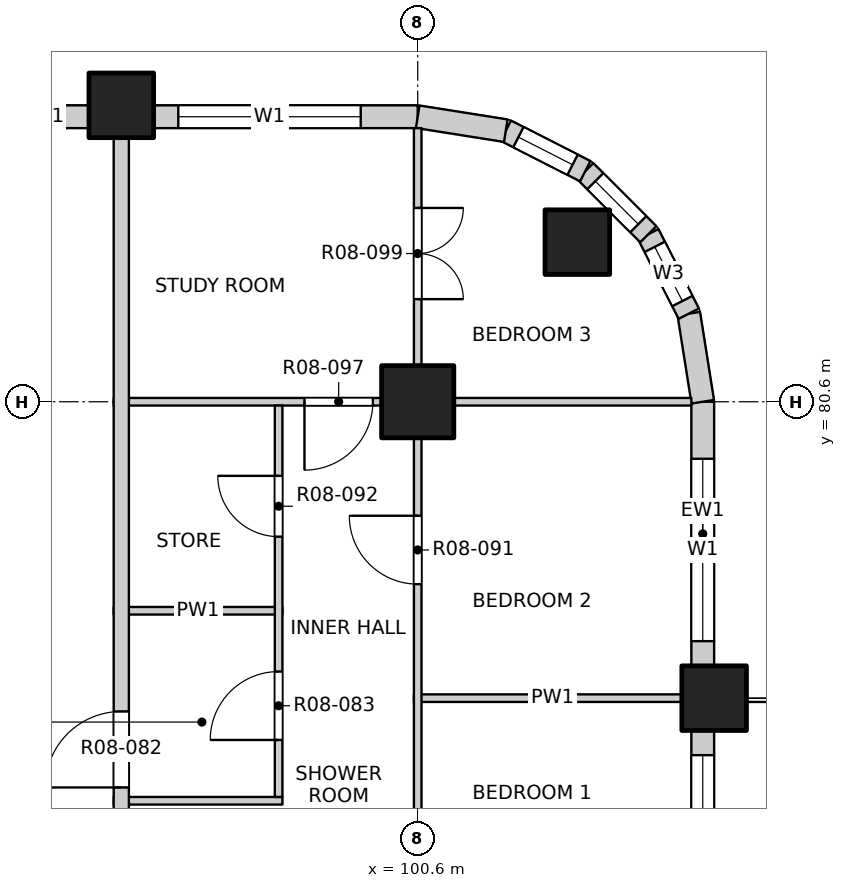
"""IFC4 building model, lengths in metres.
Left out: names, types, materials, properties, quantities, classifications, styles, units other than length and angle.
Written with IfcOpenShell. Run it as: python <this file> out.ifc"""

import sys

from ifc_helpers import new_model, si_unit, direction, frame, frame_2d, origin, origin_2d, place, context, subcontext, project, spatial, rectangle, extrude, element, fill, save


model = new_model("IFC4")
c1 = context("Model", 3, precision=1e-05, world=origin(), true_north=direction((0.0, 1.0)))
c2 = subcontext(c1, "Body", "Model", "MODEL_VIEW")
j1 = project(units=[si_unit("LENGTHUNIT", "METRE"), si_unit("PLANEANGLEUNIT", "RADIAN")], contexts=[c1])
p1 = place(None, origin())
s1 = spatial("IfcSite", under=j1, at=p1, CompositionType="ELEMENT")
p2 = place(p1, origin())
s2 = spatial("IfcBuilding", under=s1, at=p2, CompositionType="ELEMENT")
p3 = place(p2, frame((0.0, 0.0, 99.9)))
s3 = spatial("IfcBuildingStorey", under=s2, at=p3, CompositionType="ELEMENT", Elevation=99.9)
for number, where, z_axis, x_axis in (
    (1, (102.7, 82.7, -0.3), (0.0, 0.0, 1.0), (1.0, 0.0, 0.0)),
    (2, (104.5, 76.7, -0.3), (0.0, 0.0, 1.0), (1.0, 0.0, 0.0)),
    (3, (96.7, 84.5, -0.3), (0.0, 0.0, 1.0), (1.0, 0.0, 0.0)),
):
    element("IfcColumn", number, at=place(p3, frame(where, z_axis=z_axis, x_axis=x_axis)), inside=s3, PredefinedType="COLUMN", context=c2, shape_type="SweptSolid", body=[
        extrude(rectangle(XDim=0.85, YDim=0.85, at=origin_2d()), origin(), (0.0, 0.0, 1.0), 3.45),
    ])
p4 = place(p3, frame((100.6, 80.6, -0.3), z_axis=(0.0, 0.0, 1.0), x_axis=(1.0, 0.0, 0.0)))
e4 = element("IfcColumn", 4, at=p4, inside=s3, PredefinedType="COLUMN", context=c2, shape_type="SweptSolid", body=[
    extrude(rectangle(XDim=0.95, YDim=0.95, at=origin_2d()), origin(), (0.0, 0.0, 1.0), 3.45),
])
p5 = place(p3, frame((104.35, 69.325, 0.0), z_axis=(0.0, 0.0, 1.0), x_axis=(0.0, 1.0, 0.0)))
e5 = element("IfcWall", 5, at=p5, inside=s3, PredefinedType="SOLIDWALL", context=c2, shape_type="SweptSolid", body=[
    extrude(rectangle(XDim=6.95, YDim=0.3, at=frame_2d((3.475, 0.0))), origin(), (0.0, 0.0, 1.0), 2.7),
])
p6 = place(p5, frame((0.625, 0.0, 0.0)))
e6 = element("IfcOpeningElement", 6, at=p6, cuts=e5, PredefinedType="OPENING", context=c2, shape_type="SweptSolid", body=[
    extrude(rectangle(XDim=1.8, YDim=2.4, at=frame_2d((0.9, 1.2))), frame((0.0, 0.16, 0.0), z_axis=(0.0, -1.0, 0.0), x_axis=(1.0, 0.0, 0.0)), (0.0, 0.0, 1.0), 0.32),
])
p7 = place(p5, frame((4.225, 0.0, 0.9)))
e7 = element("IfcOpeningElement", 7, at=p7, cuts=e5, PredefinedType="OPENING", context=c2, shape_type="SweptSolid", body=[
    extrude(rectangle(XDim=2.4, YDim=1.8, at=frame_2d((1.2, 0.9))), frame((0.0, 0.16, 0.0), z_axis=(0.0, -1.0, 0.0), x_axis=(1.0, 0.0, 0.0)), (0.0, 0.0, 1.0), 0.32),
])
p8 = place(p3, frame((104.35, 77.125, 0.0), z_axis=(0.0, 0.0, 1.0), x_axis=(0.0, 1.0, 0.0)))
e8 = element("IfcWall", 8, at=p8, inside=s3, PredefinedType="SOLIDWALL", context=c2, shape_type="SweptSolid", body=[
    extrude(rectangle(XDim=3.475, YDim=0.3, at=frame_2d((1.738, 0.0))), origin(), (0.0, 0.0, 1.0), 2.7),
])
p9 = place(p8, frame((0.325, 0.0, 0.9)))
e9 = element("IfcOpeningElement", 9, at=p9, cuts=e8, PredefinedType="OPENING", context=c2, shape_type="SweptSolid", body=[
    extrude(rectangle(XDim=2.4, YDim=1.8, at=frame_2d((1.2, 0.9))), frame((0.0, 0.16, 0.0), z_axis=(0.0, -1.0, 0.0), x_axis=(1.0, 0.0, 0.0)), (0.0, 0.0, 1.0), 0.32),
])
p10 = place(p3, frame((95.025, 84.35, 0.0), z_axis=(0.0, 0.0, 1.0), x_axis=(1.0, 0.0, 0.0)))
e10 = element("IfcWall", 10, at=p10, inside=s3, PredefinedType="SOLIDWALL", context=c2, shape_type="SweptSolid", body=[
    extrude(rectangle(XDim=1.25, YDim=0.3, at=frame_2d((0.625, 0.0))), origin(), (0.0, 0.0, 1.0), 2.7),
])
p11 = place(p3, frame((97.125, 84.35, 0.0), z_axis=(0.0, 0.0, 1.0), x_axis=(1.0, 0.0, 0.0)))
e11 = element("IfcWall", 11, at=p11, inside=s3, PredefinedType="SOLIDWALL", context=c2, shape_type="SweptSolid", body=[
    extrude(rectangle(XDim=3.475, YDim=0.3, at=frame_2d((1.738, 0.0))), origin(), (0.0, 0.0, 1.0), 2.7),
])
p12 = place(p11, frame((0.325, 0.0, 0.9)))
e12 = element("IfcOpeningElement", 12, at=p12, cuts=e11, PredefinedType="OPENING", context=c2, shape_type="SweptSolid", body=[
    extrude(rectangle(XDim=2.4, YDim=1.8, at=frame_2d((1.2, 0.9))), frame((0.0, 0.16, 0.0), z_axis=(0.0, -1.0, 0.0), x_axis=(1.0, 0.0, 0.0)), (0.0, 0.0, 1.0), 0.32),
])
p13 = place(p3, frame((104.35, 80.6, 0.0), z_axis=(0.0, 0.0, 1.0), x_axis=(-0.156496880861, 0.987678452879, 0.0)))
e13 = element("IfcWall", 13, at=p13, inside=s3, PredefinedType="SOLIDWALL", context=c2, shape_type="SweptSolid", body=[
    extrude(rectangle(XDim=1.173, YDim=0.3, at=frame_2d((0.586, 0.0))), origin(), (0.0, 0.0, 1.0), 2.7),
])
p14 = place(p3, frame((104.167, 81.759, 0.0), z_axis=(0.0, 0.0, 1.0), x_axis=(-0.454025524128, 0.890988677504, 0.0)))
e14 = element("IfcWall", 14, at=p14, inside=s3, PredefinedType="SOLIDWALL", context=c2, shape_type="SweptSolid", body=[
    extrude(rectangle(XDim=1.173, YDim=0.3, at=frame_2d((0.587, 0.0))), origin(), (0.0, 0.0, 1.0), 2.7),
])
p15 = place(p14, frame((0.187, 0.0, 0.9)))
e15 = element("IfcOpeningElement", 15, at=p15, cuts=e14, PredefinedType="OPENING", context=c2, shape_type="SweptSolid", body=[
    extrude(rectangle(XDim=0.8, YDim=1.2, at=frame_2d((0.4, 0.6))), frame((0.0, 0.16, 0.0), z_axis=(0.0, -1.0, 0.0), x_axis=(1.0, 0.0, 0.0)), (0.0, 0.0, 1.0), 0.32),
])
p16 = place(p3, frame((103.634, 82.804, 0.0), z_axis=(0.0, 0.0, 1.0), x_axis=(-0.707106781187, 0.707106781187, 0.0)))
e16 = element("IfcWall", 16, at=p16, inside=s3, PredefinedType="SOLIDWALL", context=c2, shape_type="SweptSolid", body=[
    extrude(rectangle(XDim=1.173, YDim=0.3, at=frame_2d((0.586, 0.0))), origin(), (0.0, 0.0, 1.0), 2.7),
])
p17 = place(p16, frame((0.187, 0.0, 0.9)))
e17 = element("IfcOpeningElement", 17, at=p17, cuts=e16, PredefinedType="OPENING", context=c2, shape_type="SweptSolid", body=[
    extrude(rectangle(XDim=0.8, YDim=1.2, at=frame_2d((0.4, 0.6))), frame((0.0, 0.16, 0.0), z_axis=(0.0, -1.0, 0.0), x_axis=(1.0, 0.0, 0.0)), (0.0, 0.0, 1.0), 0.32),
])
p18 = place(p3, frame((102.804, 83.634, 0.0), z_axis=(0.0, 0.0, 1.0), x_axis=(-0.890988677504, 0.454025524128, 0.0)))
e18 = element("IfcWall", 18, at=p18, inside=s3, PredefinedType="SOLIDWALL", context=c2, shape_type="SweptSolid", body=[
    extrude(rectangle(XDim=1.173, YDim=0.3, at=frame_2d((0.587, 0.0))), origin(), (0.0, 0.0, 1.0), 2.7),
])
p19 = place(p18, frame((0.187, 0.0, 0.9)))
e19 = element("IfcOpeningElement", 19, at=p19, cuts=e18, PredefinedType="OPENING", context=c2, shape_type="SweptSolid", body=[
    extrude(rectangle(XDim=0.8, YDim=1.2, at=frame_2d((0.4, 0.6))), frame((0.0, 0.16, 0.0), z_axis=(0.0, -1.0, 0.0), x_axis=(1.0, 0.0, 0.0)), (0.0, 0.0, 1.0), 0.32),
])
p20 = place(p3, frame((101.759, 84.167, 0.0), z_axis=(0.0, 0.0, 1.0), x_axis=(-0.987678452879, 0.156496880861, 0.0)))
e20 = element("IfcWall", 20, at=p20, inside=s3, PredefinedType="SOLIDWALL", context=c2, shape_type="SweptSolid", body=[
    extrude(rectangle(XDim=1.173, YDim=0.3, at=frame_2d((0.586, 0.0))), origin(), (0.0, 0.0, 1.0), 2.7),
])
p21 = place(p3, frame((96.6, 75.35, 0.0), z_axis=(0.0, 0.0, 1.0), x_axis=(1.0, 0.0, 0.0)))
e21 = element("IfcWall", 21, at=p21, inside=s3, PredefinedType="PARTITIONING", context=c2, shape_type="SweptSolid", body=[
    extrude(rectangle(XDim=2.22, YDim=0.1, at=frame_2d((1.11, 0.0))), origin(), (0.0, 0.0, 1.0), 3.15),
])
p22 = place(p3, frame((100.55, 76.7, 0.0), z_axis=(0.0, 0.0, 1.0), x_axis=(1.0, 0.0, 0.0)))
e22 = element("IfcWall", 22, at=p22, inside=s3, PredefinedType="PARTITIONING", context=c2, shape_type="SweptSolid", body=[
    extrude(rectangle(XDim=3.65, YDim=0.1, at=frame_2d((1.825, 0.0))), origin(), (0.0, 0.0, 1.0), 2.55),
])
p23 = place(p3, frame((96.6, 77.85, 0.0), z_axis=(0.0, 0.0, 1.0), x_axis=(1.0, 0.0, 0.0)))
e23 = element("IfcWall", 23, at=p23, inside=s3, PredefinedType="PARTITIONING", context=c2, shape_type="SweptSolid", body=[
    extrude(rectangle(XDim=2.22, YDim=0.1, at=frame_2d((1.11, 0.0))), origin(), (0.0, 0.0, 1.0), 3.15),
])
p24 = place(p3, frame((96.6, 80.6, 0.0), z_axis=(0.0, 0.0, 1.0), x_axis=(1.0, 0.0, 0.0)))
e24 = element("IfcWall", 24, at=p24, inside=s3, PredefinedType="PARTITIONING", context=c2, shape_type="SweptSolid", body=[
    extrude(rectangle(XDim=7.6, YDim=0.1, at=frame_2d((3.8, 0.0))), origin(), (0.0, 0.0, 1.0), 3.15),
])
p25 = place(p24, frame((2.51, 0.0, 0.0)))
e25 = element("IfcOpeningElement", 25, at=p25, cuts=e24, PredefinedType="OPENING", context=c2, shape_type="SweptSolid", body=[
    extrude(rectangle(XDim=0.9, YDim=2.1, at=frame_2d((0.45, 1.05))), frame((0.0, 0.06, 0.0), z_axis=(0.0, -1.0, 0.0), x_axis=(1.0, 0.0, 0.0)), (0.0, 0.0, 1.0), 0.12),
])
p26 = place(p3, frame((96.7, 53.4, 0.0), z_axis=(0.0, 0.0, 1.0), x_axis=(0.0, 1.0, 0.0)))
e26 = element("IfcWall", 26, at=p26, inside=s3, PredefinedType="PARTITIONING", context=c2, shape_type="SweptSolid", body=[
    extrude(rectangle(XDim=30.8, YDim=0.2, at=frame_2d((15.4, 0.0))), origin(), (0.0, 0.0, 1.0), 3.15),
])
p27 = place(p26, frame((5.525, 0.0, 0.0)))
e27 = element("IfcOpeningElement", 27, at=p27, cuts=e26, PredefinedType="OPENING", context=c2, shape_type="SweptSolid", body=[
    extrude(rectangle(XDim=1.0, YDim=2.1, at=frame_2d((0.5, 1.05))), frame((0.0, 0.11, 0.0), z_axis=(0.0, -1.0, 0.0), x_axis=(1.0, 0.0, 0.0)), (0.0, 0.0, 1.0), 0.22),
])
p28 = place(p26, frame((13.775, 0.0, 0.0)))
e28 = element("IfcOpeningElement", 28, at=p28, cuts=e26, PredefinedType="OPENING", context=c2, shape_type="SweptSolid", body=[
    extrude(rectangle(XDim=1.0, YDim=2.1, at=frame_2d((0.5, 1.05))), frame((0.0, 0.11, 0.0), z_axis=(0.0, -1.0, 0.0), x_axis=(1.0, 0.0, 0.0)), (0.0, 0.0, 1.0), 0.22),
])
p29 = place(p26, frame((22.125, 0.0, 0.0)))
e29 = element("IfcOpeningElement", 29, at=p29, cuts=e26, PredefinedType="OPENING", context=c2, shape_type="SweptSolid", body=[
    extrude(rectangle(XDim=1.0, YDim=2.1, at=frame_2d((0.5, 1.05))), frame((0.0, 0.11, 0.0), z_axis=(0.0, -1.0, 0.0), x_axis=(1.0, 0.0, 0.0)), (0.0, 0.0, 1.0), 0.22),
])
p30 = place(p3, frame((98.77, 75.4, 0.0), z_axis=(0.0, 0.0, 1.0), x_axis=(0.0, 1.0, 0.0)))
e30 = element("IfcWall", 30, at=p30, inside=s3, PredefinedType="PARTITIONING", context=c2, shape_type="SweptSolid", body=[
    extrude(rectangle(XDim=5.15, YDim=0.1, at=frame_2d((2.575, 0.0))), origin(), (0.0, 0.0, 1.0), 3.15),
])
p31 = place(p30, frame((0.75, 0.0, 0.0)))
e31 = element("IfcOpeningElement", 31, at=p31, cuts=e30, PredefinedType="OPENING", context=c2, shape_type="SweptSolid", body=[
    extrude(rectangle(XDim=0.9, YDim=2.1, at=frame_2d((0.45, 1.05))), frame((0.0, 0.06, 0.0), z_axis=(0.0, -1.0, 0.0), x_axis=(1.0, 0.0, 0.0)), (0.0, 0.0, 1.0), 0.12),
])
p32 = place(p30, frame((3.425, 0.0, 0.0)))
e32 = element("IfcOpeningElement", 32, at=p32, cuts=e30, PredefinedType="OPENING", context=c2, shape_type="SweptSolid", body=[
    extrude(rectangle(XDim=0.8, YDim=2.1, at=frame_2d((0.4, 1.05))), frame((0.0, 0.06, 0.0), z_axis=(0.0, -1.0, 0.0), x_axis=(1.0, 0.0, 0.0)), (0.0, 0.0, 1.0), 0.12),
])
p33 = place(p3, frame((100.6, 45.8, 0.0), z_axis=(0.0, 0.0, 1.0), x_axis=(0.0, 1.0, 0.0)))
e33 = element("IfcWall", 33, at=p33, inside=s3, PredefinedType="PARTITIONING", context=c2, shape_type="SweptSolid", body=[
    extrude(rectangle(XDim=38.4, YDim=0.1, at=frame_2d((19.2, 0.0))), origin(), (0.0, 0.0, 1.0), 3.15),
])
p34 = place(p33, frame((1.05, 0.0, 0.0)))
e34 = element("IfcOpeningElement", 34, at=p34, cuts=e33, PredefinedType="OPENING", context=c2, shape_type="SweptSolid", body=[
    extrude(rectangle(XDim=1.2, YDim=2.1, at=frame_2d((0.6, 1.05))), frame((0.0, 0.06, 0.0), z_axis=(0.0, -1.0, 0.0), x_axis=(1.0, 0.0, 0.0)), (0.0, 0.0, 1.0), 0.12),
])
p35 = place(p33, frame((5.1, 0.0, 0.0)))
e35 = element("IfcOpeningElement", 35, at=p35, cuts=e33, PredefinedType="OPENING", context=c2, shape_type="SweptSolid", body=[
    extrude(rectangle(XDim=0.9, YDim=2.1, at=frame_2d((0.45, 1.05))), frame((0.0, 0.06, 0.0), z_axis=(0.0, -1.0, 0.0), x_axis=(1.0, 0.0, 0.0)), (0.0, 0.0, 1.0), 0.12),
])
p36 = place(p33, frame((9.0, 0.0, 0.0)))
e36 = element("IfcOpeningElement", 36, at=p36, cuts=e33, PredefinedType="OPENING", context=c2, shape_type="SweptSolid", body=[
    extrude(rectangle(XDim=0.9, YDim=2.1, at=frame_2d((0.45, 1.05))), frame((0.0, 0.06, 0.0), z_axis=(0.0, -1.0, 0.0), x_axis=(1.0, 0.0, 0.0)), (0.0, 0.0, 1.0), 0.12),
])
p37 = place(p33, frame((12.9, 0.0, 0.0)))
e37 = element("IfcOpeningElement", 37, at=p37, cuts=e33, PredefinedType="OPENING", context=c2, shape_type="SweptSolid", body=[
    extrude(rectangle(XDim=0.9, YDim=2.1, at=frame_2d((0.45, 1.05))), frame((0.0, 0.06, 0.0), z_axis=(0.0, -1.0, 0.0), x_axis=(1.0, 0.0, 0.0)), (0.0, 0.0, 1.0), 0.12),
])
p38 = place(p33, frame((16.8, 0.0, 0.0)))
e38 = element("IfcOpeningElement", 38, at=p38, cuts=e33, PredefinedType="OPENING", context=c2, shape_type="SweptSolid", body=[
    extrude(rectangle(XDim=0.9, YDim=2.1, at=frame_2d((0.45, 1.05))), frame((0.0, 0.06, 0.0), z_axis=(0.0, -1.0, 0.0), x_axis=(1.0, 0.0, 0.0)), (0.0, 0.0, 1.0), 0.12),
])
p39 = place(p33, frame((20.7, 0.0, 0.0)))
e39 = element("IfcOpeningElement", 39, at=p39, cuts=e33, PredefinedType="OPENING", context=c2, shape_type="SweptSolid", body=[
    extrude(rectangle(XDim=0.9, YDim=2.1, at=frame_2d((0.45, 1.05))), frame((0.0, 0.06, 0.0), z_axis=(0.0, -1.0, 0.0), x_axis=(1.0, 0.0, 0.0)), (0.0, 0.0, 1.0), 0.12),
])
p40 = place(p33, frame((24.6, 0.0, 0.0)))
e40 = element("IfcOpeningElement", 40, at=p40, cuts=e33, PredefinedType="OPENING", context=c2, shape_type="SweptSolid", body=[
    extrude(rectangle(XDim=0.9, YDim=2.1, at=frame_2d((0.45, 1.05))), frame((0.0, 0.06, 0.0), z_axis=(0.0, -1.0, 0.0), x_axis=(1.0, 0.0, 0.0)), (0.0, 0.0, 1.0), 0.12),
])
p41 = place(p33, frame((28.5, 0.0, 0.0)))
e41 = element("IfcOpeningElement", 41, at=p41, cuts=e33, PredefinedType="OPENING", context=c2, shape_type="SweptSolid", body=[
    extrude(rectangle(XDim=0.9, YDim=2.1, at=frame_2d((0.45, 1.05))), frame((0.0, 0.06, 0.0), z_axis=(0.0, -1.0, 0.0), x_axis=(1.0, 0.0, 0.0)), (0.0, 0.0, 1.0), 0.12),
])
p42 = place(p33, frame((32.4, 0.0, 0.0)))
e42 = element("IfcOpeningElement", 42, at=p42, cuts=e33, PredefinedType="OPENING", context=c2, shape_type="SweptSolid", body=[
    extrude(rectangle(XDim=0.9, YDim=2.1, at=frame_2d((0.45, 1.05))), frame((0.0, 0.06, 0.0), z_axis=(0.0, -1.0, 0.0), x_axis=(1.0, 0.0, 0.0)), (0.0, 0.0, 1.0), 0.12),
])
p43 = place(p33, frame((36.15, 0.0, 0.0)))
e43 = element("IfcOpeningElement", 43, at=p43, cuts=e33, PredefinedType="OPENING", context=c2, shape_type="SweptSolid", body=[
    extrude(rectangle(XDim=1.2, YDim=2.1, at=frame_2d((0.6, 1.05))), frame((0.0, 0.06, 0.0), z_axis=(0.0, -1.0, 0.0), x_axis=(1.0, 0.0, 0.0)), (0.0, 0.0, 1.0), 0.12),
])
p44 = place(p7, origin())
e44 = element("IfcWindow", 44, at=p44, inside=s3, PartitioningType="DOUBLE_PANEL_VERTICAL", PredefinedType="WINDOW", context=c2, shape_type="SweptSolid", body=[
    extrude(rectangle(XDim=2.4, YDim=1.8, at=frame_2d((1.2, 0.9))), frame((0.0, 0.03, 0.0), z_axis=(0.0, -1.0, 0.0), x_axis=(1.0, 0.0, 0.0)), (0.0, 0.0, 1.0), 0.06),
])
fill(e7, e44)
p45 = place(p9, origin())
e45 = element("IfcWindow", 45, at=p45, inside=s3, PartitioningType="DOUBLE_PANEL_VERTICAL", PredefinedType="WINDOW", context=c2, shape_type="SweptSolid", body=[
    extrude(rectangle(XDim=2.4, YDim=1.8, at=frame_2d((1.2, 0.9))), frame((0.0, 0.03, 0.0), z_axis=(0.0, -1.0, 0.0), x_axis=(1.0, 0.0, 0.0)), (0.0, 0.0, 1.0), 0.06),
])
fill(e9, e45)
p46 = place(p12, origin())
e46 = element("IfcWindow", 46, at=p46, inside=s3, PartitioningType="DOUBLE_PANEL_VERTICAL", PredefinedType="WINDOW", context=c2, shape_type="SweptSolid", body=[
    extrude(rectangle(XDim=2.4, YDim=1.8, at=frame_2d((1.2, 0.9))), frame((0.0, 0.03, 0.0), z_axis=(0.0, -1.0, 0.0), x_axis=(1.0, 0.0, 0.0)), (0.0, 0.0, 1.0), 0.06),
])
fill(e12, e46)
p47 = place(p15, origin())
e47 = element("IfcWindow", 47, at=p47, inside=s3, PartitioningType="SINGLE_PANEL", PredefinedType="WINDOW", context=c2, shape_type="SweptSolid", body=[
    extrude(rectangle(XDim=0.8, YDim=1.2, at=frame_2d((0.4, 0.6))), frame((0.0, 0.03, 0.0), z_axis=(0.0, -1.0, 0.0), x_axis=(1.0, 0.0, 0.0)), (0.0, 0.0, 1.0), 0.06),
])
fill(e15, e47)
p48 = place(p17, origin())
e48 = element("IfcWindow", 48, at=p48, inside=s3, PartitioningType="SINGLE_PANEL", PredefinedType="WINDOW", context=c2, shape_type="SweptSolid", body=[
    extrude(rectangle(XDim=0.8, YDim=1.2, at=frame_2d((0.4, 0.6))), frame((0.0, 0.03, 0.0), z_axis=(0.0, -1.0, 0.0), x_axis=(1.0, 0.0, 0.0)), (0.0, 0.0, 1.0), 0.06),
])
fill(e17, e48)
p49 = place(p19, origin())
e49 = element("IfcWindow", 49, at=p49, inside=s3, PartitioningType="SINGLE_PANEL", PredefinedType="WINDOW", context=c2, shape_type="SweptSolid", body=[
    extrude(rectangle(XDim=0.8, YDim=1.2, at=frame_2d((0.4, 0.6))), frame((0.0, 0.03, 0.0), z_axis=(0.0, -1.0, 0.0), x_axis=(1.0, 0.0, 0.0)), (0.0, 0.0, 1.0), 0.06),
])
fill(e19, e49)
p50 = place(p29, origin())
e50 = element("IfcDoor", 50, at=p50, inside=s3, OperationType="SINGLE_SWING_LEFT", PredefinedType="DOOR", context=c2, shape_type="SweptSolid", body=[
    extrude(rectangle(XDim=1.0, YDim=2.1, at=frame_2d((0.5, 1.05))), frame((0.0, 0.025, 0.0), z_axis=(0.0, -1.0, 0.0), x_axis=(1.0, 0.0, 0.0)), (0.0, 0.0, 1.0), 0.05),
])
fill(e29, e50)
p51 = place(p31, origin())
e51 = element("IfcDoor", 51, at=p51, inside=s3, OperationType="SINGLE_SWING_LEFT", PredefinedType="DOOR", context=c2, shape_type="SweptSolid", body=[
    extrude(rectangle(XDim=0.9, YDim=2.1, at=frame_2d((0.45, 1.05))), frame((0.0, 0.025, 0.0), z_axis=(0.0, -1.0, 0.0), x_axis=(1.0, 0.0, 0.0)), (0.0, 0.0, 1.0), 0.05),
])
fill(e31, e51)
p52 = place(p42, origin())
e52 = element("IfcDoor", 52, at=p52, inside=s3, OperationType="SINGLE_SWING_RIGHT", PredefinedType="DOOR", context=c2, shape_type="SweptSolid", body=[
    extrude(rectangle(XDim=0.9, YDim=2.1, at=frame_2d((0.45, 1.05))), frame((0.0, 0.025, 0.0), z_axis=(0.0, -1.0, 0.0), x_axis=(1.0, 0.0, 0.0)), (0.0, 0.0, 1.0), 0.05),
])
fill(e42, e52)
p53 = place(p32, origin())
e53 = element("IfcDoor", 53, at=p53, inside=s3, OperationType="SINGLE_SWING_RIGHT", PredefinedType="DOOR", context=c2, shape_type="SweptSolid", body=[
    extrude(rectangle(XDim=0.8, YDim=2.1, at=frame_2d((0.4, 1.05))), frame((0.0, 0.025, 0.0), z_axis=(0.0, -1.0, 0.0), x_axis=(1.0, 0.0, 0.0)), (0.0, 0.0, 1.0), 0.05),
])
fill(e32, e53)
p54 = place(p25, origin())
e54 = element("IfcDoor", 54, at=p54, inside=s3, OperationType="SINGLE_SWING_RIGHT", PredefinedType="DOOR", context=c2, shape_type="SweptSolid", body=[
    extrude(rectangle(XDim=0.9, YDim=2.1, at=frame_2d((0.45, 1.05))), frame((0.0, 0.025, 0.0), z_axis=(0.0, -1.0, 0.0), x_axis=(1.0, 0.0, 0.0)), (0.0, 0.0, 1.0), 0.05),
])
fill(e25, e54)
p55 = place(p43, origin())
e55 = element("IfcDoor", 55, at=p55, inside=s3, OperationType="DOUBLE_DOOR_SINGLE_SWING", PredefinedType="DOOR", context=c2, shape_type="SweptSolid", body=[
    extrude(rectangle(XDim=1.2, YDim=2.1, at=frame_2d((0.6, 1.05))), frame((0.0, 0.025, 0.0), z_axis=(0.0, -1.0, 0.0), x_axis=(1.0, 0.0, 0.0)), (0.0, 0.0, 1.0), 0.05),
])
fill(e43, e55)
save(model, sys.argv[1])
